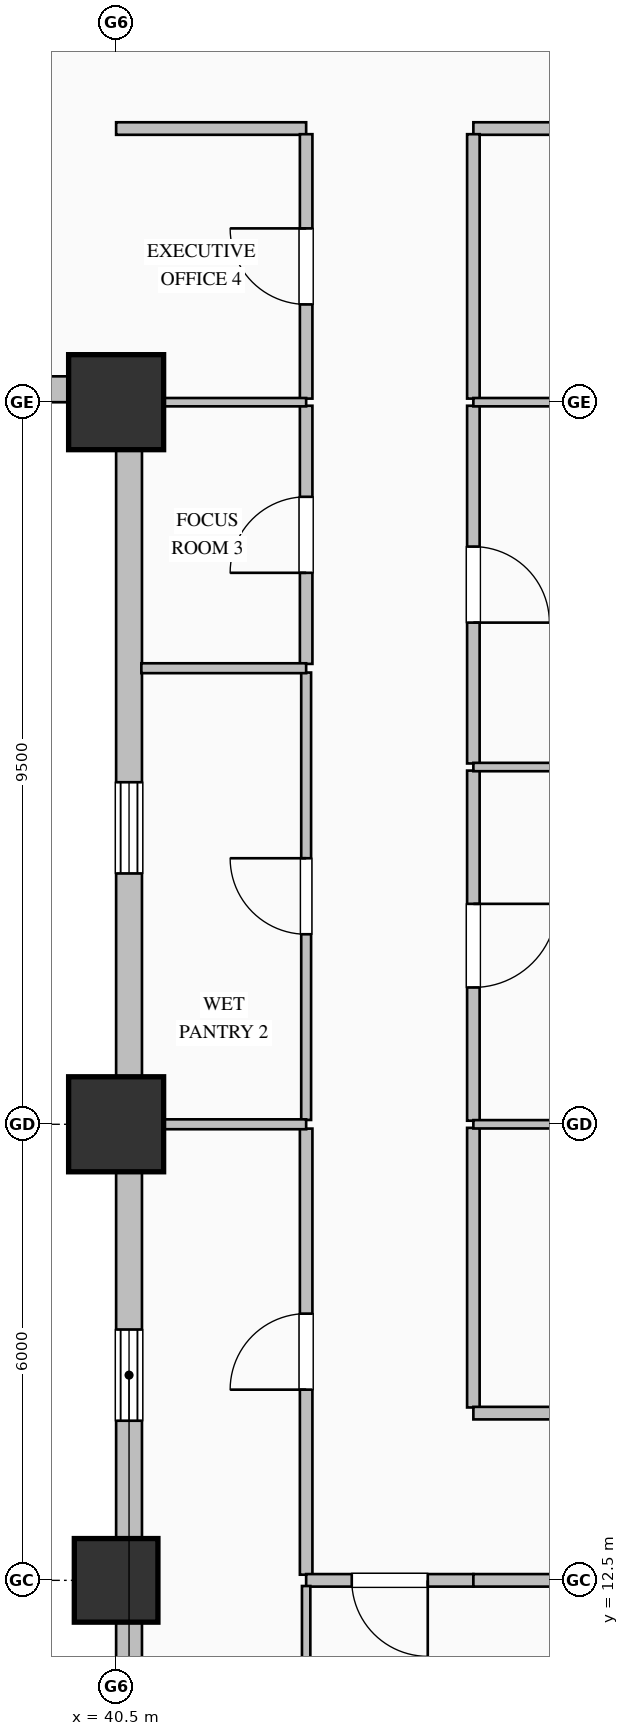
"""IFC4 building model, lengths in metres.
Left out: names, types, materials, properties, quantities, classifications, styles, units other than length and angle.
Written with IfcOpenShell. Run it as: python <this file> out.ifc"""

import sys

from ifc_helpers import new_model, si_unit, direction, frame, frame_2d, origin, origin_2d, place, context, subcontext, project, spatial, rectangle, hollow_rectangle, extrude, element, fill, save


model = new_model("IFC4")
c1 = context("Model", 3, precision=1e-05, world=origin(), true_north=direction((0.0, 1.0)))
c2 = subcontext(c1, "Body", "Model", "MODEL_VIEW")
j1 = project(units=[si_unit("LENGTHUNIT", "METRE"), si_unit("PLANEANGLEUNIT", "RADIAN")], contexts=[c1])
p1 = place(None, origin())
s1 = spatial("IfcSite", under=j1, at=p1, CompositionType="ELEMENT")
p2 = place(p1, origin())
s2 = spatial("IfcBuilding", under=s1, at=p2, CompositionType="ELEMENT")
p3 = place(p2, frame((0.0, 0.0, 40.2)))
s3 = spatial("IfcBuildingStorey", under=s2, at=p3, CompositionType="ELEMENT", Elevation=40.2)
p4 = place(p3, frame((40.5, 12.5, 0.0), z_axis=(0.0, 0.0, 1.0), x_axis=(1.0, 0.0, 0.0)))
e1 = element("IfcColumn", 1, at=p4, inside=s3, PredefinedType="COLUMN", context=c2, shape_type="SweptSolid", body=[
    extrude(hollow_rectangle(XDim=1.1, YDim=1.1, WallThickness=0.04, at=origin_2d()), origin(), (0.0, 0.0, 1.0), 4.0),
])
for number, where, z_axis, x_axis in (
    (2, (40.5, 18.5, 0.0), (0.0, 0.0, 1.0), (1.0, 0.0, 0.0)),
    (3, (40.5, 28.0, 0.0), (0.0, 0.0, 1.0), (1.0, 0.0, 0.0)),
):
    element("IfcColumn", number, at=place(p3, frame(where, z_axis=z_axis, x_axis=x_axis)), inside=s3, PredefinedType="COLUMN", context=c2, shape_type="SweptSolid", body=[
        extrude(hollow_rectangle(XDim=1.25, YDim=1.25, WallThickness=0.045, at=origin_2d()), origin(), (0.0, 0.0, 1.0), 4.0),
    ])
p5 = place(p3, frame((40.67, 8.0, 0.0), z_axis=(0.0, 0.0, 1.0), x_axis=(0.0, 1.0, 0.0)))
e4 = element("IfcWall", 4, at=p5, inside=s3, PredefinedType="SOLIDWALL", context=c2, shape_type="SweptSolid", body=[
    extrude(rectangle(XDim=20.34, YDim=0.34, at=frame_2d((10.17, 0.0))), origin(), (0.0, 0.0, 1.0), 3.05),
])
p6 = place(p5, frame((6.6, 0.0, 0.7)))
e5 = element("IfcOpeningElement", 5, at=p6, cuts=e4, PredefinedType="OPENING", context=c2, shape_type="SweptSolid", body=[
    extrude(rectangle(XDim=1.2, YDim=1.85, at=frame_2d((0.6, 0.925))), frame((0.0, 0.18, 0.0), z_axis=(0.0, -1.0, 0.0), x_axis=(1.0, 0.0, 0.0)), (0.0, 0.0, 1.0), 0.36),
])
p7 = place(p5, frame((13.8, 0.0, 0.7)))
e6 = element("IfcOpeningElement", 6, at=p7, cuts=e4, PredefinedType="OPENING", context=c2, shape_type="SweptSolid", body=[
    extrude(rectangle(XDim=1.2, YDim=1.85, at=frame_2d((0.6, 0.925))), frame((0.0, 0.18, 0.0), z_axis=(0.0, -1.0, 0.0), x_axis=(1.0, 0.0, 0.0)), (0.0, 0.0, 1.0), 0.36),
])
p8 = place(p3, frame((40.52, 28.17, 0.0), z_axis=(0.0, 0.0, 1.0), x_axis=(-1.0, 0.0, 0.0)))
e7 = element("IfcWall", 7, at=p8, inside=s3, PredefinedType="SOLIDWALL", context=c2, shape_type="SweptSolid", body=[
    extrude(rectangle(XDim=36.52, YDim=0.34, at=frame_2d((18.26, 0.0))), origin(), (0.0, 0.0, 1.0), 3.05),
])
p9 = place(p8, frame((10.2, 0.0, 0.7)))
e8 = element("IfcOpeningElement", 8, at=p9, cuts=e7, PredefinedType="OPENING", context=c2, shape_type="SweptSolid", body=[
    extrude(rectangle(XDim=1.2, YDim=1.85, at=frame_2d((0.6, 0.925))), frame((0.0, 0.18, 0.0), z_axis=(0.0, -1.0, 0.0), x_axis=(1.0, 0.0, 0.0)), (0.0, 0.0, 1.0), 0.36),
])
p10 = place(p8, frame((13.8, 0.0, 0.7)))
e9 = element("IfcOpeningElement", 9, at=p10, cuts=e7, PredefinedType="OPENING", context=c2, shape_type="SweptSolid", body=[
    extrude(rectangle(XDim=1.2, YDim=1.85, at=frame_2d((0.6, 0.925))), frame((0.0, 0.18, 0.0), z_axis=(0.0, -1.0, 0.0), x_axis=(1.0, 0.0, 0.0)), (0.0, 0.0, 1.0), 0.36),
])
p11 = place(p8, frame((17.4, 0.0, 0.7)))
e10 = element("IfcOpeningElement", 10, at=p11, cuts=e7, PredefinedType="OPENING", context=c2, shape_type="SweptSolid", body=[
    extrude(rectangle(XDim=1.2, YDim=1.85, at=frame_2d((0.6, 0.925))), frame((0.0, 0.18, 0.0), z_axis=(0.0, -1.0, 0.0), x_axis=(1.0, 0.0, 0.0)), (0.0, 0.0, 1.0), 0.36),
])
p12 = place(p8, frame((21.0, 0.0, 0.7)))
e11 = element("IfcOpeningElement", 11, at=p12, cuts=e7, PredefinedType="OPENING", context=c2, shape_type="SweptSolid", body=[
    extrude(rectangle(XDim=1.2, YDim=1.85, at=frame_2d((0.6, 0.925))), frame((0.0, 0.18, 0.0), z_axis=(0.0, -1.0, 0.0), x_axis=(1.0, 0.0, 0.0)), (0.0, 0.0, 1.0), 0.36),
])
p13 = place(p8, frame((28.2, 0.0, 0.7)))
e12 = element("IfcOpeningElement", 12, at=p13, cuts=e7, PredefinedType="OPENING", context=c2, shape_type="SweptSolid", body=[
    extrude(rectangle(XDim=1.2, YDim=1.85, at=frame_2d((0.6, 0.925))), frame((0.0, 0.18, 0.0), z_axis=(0.0, -1.0, 0.0), x_axis=(1.0, 0.0, 0.0)), (0.0, 0.0, 1.0), 0.36),
])
p14 = place(p3, frame((56.5, 31.6, 0.0), z_axis=(0.0, 0.0, 1.0), x_axis=(-1.0, 0.0, 0.0)))
e13 = element("IfcWall", 13, at=p14, inside=s3, PredefinedType="PARTITIONING", context=c2, shape_type="SweptSolid", body=[
    extrude(rectangle(XDim=11.3, YDim=0.165, at=frame_2d((5.65, 0.0))), origin(), (0.0, 0.0, 1.0), 3.75),
])
p15 = place(p14, frame((5.15, 0.0, 0.0)))
e14 = element("IfcOpeningElement", 14, at=p15, cuts=e13, PredefinedType="OPENING", context=c2, shape_type="SweptSolid", body=[
    extrude(rectangle(XDim=1.0, YDim=2.15, at=frame_2d((0.5, 1.075))), frame((0.0, 0.093, 0.0), z_axis=(0.0, -1.0, 0.0), x_axis=(1.0, 0.0, 0.0)), (0.0, 0.0, 1.0), 0.185),
])
p16 = place(p3, frame((43.0, 31.6, 0.0), z_axis=(0.0, 0.0, 1.0), x_axis=(-1.0, 0.0, 0.0)))
e15 = element("IfcWall", 15, at=p16, inside=s3, PredefinedType="PARTITIONING", context=c2, shape_type="SweptSolid", body=[
    extrude(rectangle(XDim=2.5, YDim=0.165, at=frame_2d((1.25, 0.0))), origin(), (0.0, 0.0, 1.0), 3.75),
])
p17 = place(p3, frame((45.2, 18.453, 0.0), z_axis=(0.0, 0.0, 1.0), x_axis=(0.0, -1.0, 0.0)))
e16 = element("IfcWall", 16, at=p17, inside=s3, PredefinedType="PARTITIONING", context=c2, shape_type="SweptSolid", body=[
    extrude(rectangle(XDim=3.678, YDim=0.165, at=frame_2d((1.839, 0.0))), origin(), (0.0, 0.0, 1.0), 3.75),
])
p18 = place(p3, frame((45.2, 23.153, 0.0), z_axis=(0.0, 0.0, 1.0), x_axis=(0.0, -1.0, 0.0)))
e17 = element("IfcWall", 17, at=p18, inside=s3, PredefinedType="PARTITIONING", context=c2, shape_type="SweptSolid", body=[
    extrude(rectangle(XDim=4.606, YDim=0.165, at=frame_2d((2.303, 0.0))), origin(), (0.0, 0.0, 1.0), 3.75),
])
p19 = place(p18, frame((1.753, 0.0, 0.0)))
e18 = element("IfcOpeningElement", 18, at=p19, cuts=e17, PredefinedType="OPENING", context=c2, shape_type="SweptSolid", body=[
    extrude(rectangle(XDim=1.1, YDim=2.2, at=frame_2d((0.55, 1.1))), frame((0.0, 0.093, 0.0), z_axis=(0.0, -1.0, 0.0), x_axis=(1.0, 0.0, 0.0)), (0.0, 0.0, 1.0), 0.185),
])
p20 = place(p3, frame((45.2, 27.953, 0.0), z_axis=(0.0, 0.0, 1.0), x_axis=(0.0, -1.0, 0.0)))
e19 = element("IfcWall", 19, at=p20, inside=s3, PredefinedType="PARTITIONING", context=c2, shape_type="SweptSolid", body=[
    extrude(rectangle(XDim=4.706, YDim=0.165, at=frame_2d((2.353, 0.0))), origin(), (0.0, 0.0, 1.0), 3.75),
])
p21 = place(p20, frame((1.853, 0.0, 0.0)))
e20 = element("IfcOpeningElement", 20, at=p21, cuts=e19, PredefinedType="OPENING", context=c2, shape_type="SweptSolid", body=[
    extrude(rectangle(XDim=1.0, YDim=2.15, at=frame_2d((0.5, 1.075))), frame((0.0, 0.093, 0.0), z_axis=(0.0, -1.0, 0.0), x_axis=(1.0, 0.0, 0.0)), (0.0, 0.0, 1.0), 0.185),
])
p22 = place(p3, frame((45.2, 31.525, 0.0), z_axis=(0.0, 0.0, 1.0), x_axis=(0.0, -1.0, 0.0)))
e21 = element("IfcWall", 21, at=p22, inside=s3, PredefinedType="PARTITIONING", context=c2, shape_type="SweptSolid", body=[
    extrude(rectangle(XDim=3.478, YDim=0.165, at=frame_2d((1.739, 0.0))), origin(), (0.0, 0.0, 1.0), 3.75),
])
p23 = place(p3, frame((43.0, 12.574, 0.0), z_axis=(0.0, 0.0, 1.0), x_axis=(0.0, 1.0, 0.0)))
e22 = element("IfcWall", 22, at=p23, inside=s3, PredefinedType="PARTITIONING", context=c2, shape_type="SweptSolid", body=[
    extrude(rectangle(XDim=5.869, YDim=0.165, at=frame_2d((2.934, 0.0))), origin(), (0.0, 0.0, 1.0), 3.75),
])
p24 = place(p23, frame((2.434, 0.0, 0.0)))
e23 = element("IfcOpeningElement", 23, at=p24, cuts=e22, PredefinedType="OPENING", context=c2, shape_type="SweptSolid", body=[
    extrude(rectangle(XDim=1.0, YDim=2.15, at=frame_2d((0.5, 1.075))), frame((0.0, 0.093, 0.0), z_axis=(0.0, -1.0, 0.0), x_axis=(1.0, 0.0, 0.0)), (0.0, 0.0, 1.0), 0.185),
])
p25 = place(p3, frame((43.0, 18.557, 0.0), z_axis=(0.0, 0.0, 1.0), x_axis=(0.0, 1.0, 0.0)))
e24 = element("IfcWall", 24, at=p25, inside=s3, PredefinedType="PARTITIONING", context=c2, shape_type="SweptSolid", body=[
    extrude(rectangle(XDim=5.886, YDim=0.13, at=frame_2d((2.943, 0.0))), origin(), (0.0, 0.0, 1.0), 3.75),
])
p26 = place(p25, frame((2.443, 0.0, 0.0)))
e25 = element("IfcOpeningElement", 25, at=p26, cuts=e24, PredefinedType="OPENING", context=c2, shape_type="SweptSolid", body=[
    extrude(rectangle(XDim=1.0, YDim=2.15, at=frame_2d((0.5, 1.075))), frame((0.0, 0.075, 0.0), z_axis=(0.0, -1.0, 0.0), x_axis=(1.0, 0.0, 0.0)), (0.0, 0.0, 1.0), 0.15),
])
p27 = place(p3, frame((43.0, 24.557, 0.0), z_axis=(0.0, 0.0, 1.0), x_axis=(0.0, 1.0, 0.0)))
e26 = element("IfcWall", 26, at=p27, inside=s3, PredefinedType="PARTITIONING", context=c2, shape_type="SweptSolid", body=[
    extrude(rectangle(XDim=3.396, YDim=0.165, at=frame_2d((1.698, 0.0))), origin(), (0.0, 0.0, 1.0), 3.75),
])
p28 = place(p27, frame((1.198, 0.0, 0.0)))
e27 = element("IfcOpeningElement", 27, at=p28, cuts=e26, PredefinedType="OPENING", context=c2, shape_type="SweptSolid", body=[
    extrude(rectangle(XDim=1.0, YDim=2.15, at=frame_2d((0.5, 1.075))), frame((0.0, 0.093, 0.0), z_axis=(0.0, -1.0, 0.0), x_axis=(1.0, 0.0, 0.0)), (0.0, 0.0, 1.0), 0.185),
])
p29 = place(p3, frame((43.0, 28.047, 0.0), z_axis=(0.0, 0.0, 1.0), x_axis=(0.0, 1.0, 0.0)))
e28 = element("IfcWall", 28, at=p29, inside=s3, PredefinedType="PARTITIONING", context=c2, shape_type="SweptSolid", body=[
    extrude(rectangle(XDim=3.478, YDim=0.165, at=frame_2d((1.739, 0.0))), origin(), (0.0, 0.0, 1.0), 3.75),
])
p30 = place(p29, frame((1.239, 0.0, 0.0)))
e29 = element("IfcOpeningElement", 29, at=p30, cuts=e28, PredefinedType="OPENING", context=c2, shape_type="SweptSolid", body=[
    extrude(rectangle(XDim=1.0, YDim=2.15, at=frame_2d((0.5, 1.075))), frame((0.0, 0.093, 0.0), z_axis=(0.0, -1.0, 0.0), x_axis=(1.0, 0.0, 0.0)), (0.0, 0.0, 1.0), 0.185),
])
p31 = place(p3, frame((45.2, 12.5, 0.0), z_axis=(0.0, 0.0, 1.0), x_axis=(-1.0, 0.0, 0.0)))
e30 = element("IfcWall", 30, at=p31, inside=s3, PredefinedType="PARTITIONING", context=c2, shape_type="SweptSolid", body=[
    extrude(rectangle(XDim=2.2, YDim=0.165, at=frame_2d((1.1, 0.0))), origin(), (0.0, 0.0, 1.0), 3.042),
])
p32 = place(p31, frame((0.6, 0.0, 0.0)))
e31 = element("IfcOpeningElement", 31, at=p32, cuts=e30, PredefinedType="OPENING", context=c2, shape_type="SweptSolid", body=[
    extrude(rectangle(XDim=1.0, YDim=2.15, at=frame_2d((0.5, 1.075))), frame((0.0, 0.093, 0.0), z_axis=(0.0, -1.0, 0.0), x_axis=(1.0, 0.0, 0.0)), (0.0, 0.0, 1.0), 0.185),
])
p33 = place(p3, frame((45.2, 14.7, 0.0), z_axis=(0.0, 0.0, 1.0), x_axis=(1.0, 0.0, 0.0)))
e32 = element("IfcWall", 32, at=p33, inside=s3, PredefinedType="PARTITIONING", context=c2, shape_type="SweptSolid", body=[
    extrude(rectangle(XDim=16.3, YDim=0.165, at=frame_2d((8.15, 0.0))), origin(), (0.0, 0.0, 1.0), 3.75),
])
p34 = place(p33, frame((7.65, 0.0, 0.0)))
e33 = element("IfcOpeningElement", 33, at=p34, cuts=e32, PredefinedType="OPENING", context=c2, shape_type="SweptSolid", body=[
    extrude(rectangle(XDim=1.0, YDim=2.15, at=frame_2d((0.5, 1.075))), frame((0.0, 0.093, 0.0), z_axis=(0.0, -1.0, 0.0), x_axis=(1.0, 0.0, 0.0)), (0.0, 0.0, 1.0), 0.185),
])
p35 = place(p3, frame((46.5, 12.5, 0.0), z_axis=(0.0, 0.0, 1.0), x_axis=(-1.0, 0.0, 0.0)))
e34 = element("IfcWall", 34, at=p35, inside=s3, PredefinedType="PARTITIONING", context=c2, shape_type="SweptSolid", body=[
    extrude(rectangle(XDim=1.3, YDim=0.165, at=frame_2d((0.65, 0.0))), origin(), (0.0, 0.0, 1.0), 3.042),
])
p36 = place(p3, frame((45.2, 18.5, 0.0), z_axis=(0.0, 0.0, 1.0), x_axis=(1.0, 0.0, 0.0)))
e35 = element("IfcWall", 35, at=p36, inside=s3, PredefinedType="MOVABLE", context=c2, shape_type="SweptSolid", body=[
    extrude(rectangle(XDim=18.468, YDim=0.11, at=frame_2d((9.234, 0.0))), origin(), (0.0, 0.0, 1.0), 3.042),
])
p37 = place(p3, frame((45.2, 23.2, 0.0), z_axis=(0.0, 0.0, 1.0), x_axis=(1.0, 0.0, 0.0)))
e36 = element("IfcWall", 36, at=p37, inside=s3, PredefinedType="MOVABLE", context=c2, shape_type="SweptSolid", body=[
    extrude(rectangle(XDim=18.468, YDim=0.11, at=frame_2d((9.234, 0.0))), origin(), (0.0, 0.0, 1.0), 3.342),
])
p38 = place(p3, frame((45.2, 28.0, 0.0), z_axis=(0.0, 0.0, 1.0), x_axis=(1.0, 0.0, 0.0)))
e37 = element("IfcWall", 37, at=p38, inside=s3, PredefinedType="MOVABLE", context=c2, shape_type="SweptSolid", body=[
    extrude(rectangle(XDim=18.468, YDim=0.11, at=frame_2d((9.234, 0.0))), origin(), (0.0, 0.0, 1.0), 3.042),
])
p39 = place(p3, frame((40.832, 18.5, 0.0), z_axis=(0.0, 0.0, 1.0), x_axis=(1.0, 0.0, 0.0)))
e38 = element("IfcWall", 38, at=p39, inside=s3, PredefinedType="PARTITIONING", context=c2, shape_type="SweptSolid", body=[
    extrude(rectangle(XDim=2.168, YDim=0.13, at=frame_2d((1.084, 0.0))), origin(), (0.0, 0.0, 1.0), 3.042),
])
p40 = place(p3, frame((43.0, 12.426, 0.0), z_axis=(0.0, 0.0, 1.0), x_axis=(0.0, -1.0, 0.0)))
e39 = element("IfcWall", 39, at=p40, inside=s3, PredefinedType="MOVABLE", context=c2, shape_type="SweptSolid", body=[
    extrude(rectangle(XDim=6.456, YDim=0.11, at=frame_2d((3.228, 0.0))), origin(), (0.0, 0.0, 1.0), 3.75),
])
p41 = place(p3, frame((40.832, 24.5, 0.0), z_axis=(0.0, 0.0, 1.0), x_axis=(1.0, 0.0, 0.0)))
e40 = element("IfcWall", 40, at=p41, inside=s3, PredefinedType="PARTITIONING", context=c2, shape_type="SweptSolid", body=[
    extrude(rectangle(XDim=2.168, YDim=0.13, at=frame_2d((1.084, 0.0))), origin(), (0.0, 0.0, 1.0), 3.75),
])
p42 = place(p3, frame((40.832, 28.0, 0.0), z_axis=(0.0, 0.0, 1.0), x_axis=(1.0, 0.0, 0.0)))
e41 = element("IfcWall", 41, at=p42, inside=s3, PredefinedType="MOVABLE", context=c2, shape_type="SweptSolid", body=[
    extrude(rectangle(XDim=2.168, YDim=0.11, at=frame_2d((1.084, 0.0))), origin(), (0.0, 0.0, 1.0), 3.042),
])
p43 = place(p6, origin())
e42 = element("IfcWindow", 42, at=p43, inside=s3, PartitioningType="DOUBLE_PANEL_VERTICAL", PredefinedType="WINDOW", context=c2, shape_type="SweptSolid", body=[
    extrude(rectangle(XDim=1.2, YDim=1.85, at=frame_2d((0.6, 0.925))), frame((0.0, 0.15, 0.0), z_axis=(0.0, -1.0, 0.0), x_axis=(1.0, 0.0, 0.0)), (0.0, 0.0, 1.0), 0.06),
])
fill(e5, e42)
p44 = place(p7, origin())
e43 = element("IfcWindow", 43, at=p44, inside=s3, PartitioningType="DOUBLE_PANEL_VERTICAL", PredefinedType="WINDOW", context=c2, shape_type="SweptSolid", body=[
    extrude(rectangle(XDim=1.2, YDim=1.85, at=frame_2d((0.6, 0.925))), frame((0.0, 0.15, 0.0), z_axis=(0.0, -1.0, 0.0), x_axis=(1.0, 0.0, 0.0)), (0.0, 0.0, 1.0), 0.06),
])
fill(e6, e43)
p45 = place(p19, origin())
e44 = element("IfcDoor", 44, at=p45, inside=s3, OperationType="SINGLE_SWING_LEFT", PredefinedType="DOOR", context=c2, shape_type="SweptSolid", body=[
    extrude(rectangle(XDim=1.1, YDim=2.2, at=frame_2d((0.55, 1.1))), frame((0.0, 0.025, 0.0), z_axis=(0.0, -1.0, 0.0), x_axis=(1.0, 0.0, 0.0)), (0.0, 0.0, 1.0), 0.05),
])
fill(e18, e44)
p46 = place(p21, origin())
e45 = element("IfcDoor", 45, at=p46, inside=s3, OperationType="SINGLE_SWING_RIGHT", PredefinedType="DOOR", context=c2, shape_type="SweptSolid", body=[
    extrude(rectangle(XDim=1.0, YDim=2.15, at=frame_2d((0.5, 1.075))), frame((0.0, 0.025, 0.0), z_axis=(0.0, -1.0, 0.0), x_axis=(1.0, 0.0, 0.0)), (0.0, 0.0, 1.0), 0.05),
])
fill(e20, e45)
p47 = place(p24, origin())
e46 = element("IfcDoor", 46, at=p47, inside=s3, OperationType="SINGLE_SWING_LEFT", PredefinedType="DOOR", context=c2, shape_type="SweptSolid", body=[
    extrude(rectangle(XDim=1.0, YDim=2.15, at=frame_2d((0.5, 1.075))), frame((0.0, 0.025, 0.0), z_axis=(0.0, -1.0, 0.0), x_axis=(1.0, 0.0, 0.0)), (0.0, 0.0, 1.0), 0.05),
])
fill(e23, e46)
p48 = place(p26, origin())
e47 = element("IfcDoor", 47, at=p48, inside=s3, OperationType="SINGLE_SWING_RIGHT", PredefinedType="DOOR", context=c2, shape_type="SweptSolid", body=[
    extrude(rectangle(XDim=1.0, YDim=2.15, at=frame_2d((0.5, 1.075))), frame((0.0, 0.025, 0.0), z_axis=(0.0, -1.0, 0.0), x_axis=(1.0, 0.0, 0.0)), (0.0, 0.0, 1.0), 0.05),
])
fill(e25, e47)
p49 = place(p28, origin())
e48 = element("IfcDoor", 48, at=p49, inside=s3, OperationType="SINGLE_SWING_LEFT", PredefinedType="DOOR", context=c2, shape_type="SweptSolid", body=[
    extrude(rectangle(XDim=1.0, YDim=2.15, at=frame_2d((0.5, 1.075))), frame((0.0, 0.025, 0.0), z_axis=(0.0, -1.0, 0.0), x_axis=(1.0, 0.0, 0.0)), (0.0, 0.0, 1.0), 0.05),
])
fill(e27, e48)
p50 = place(p30, origin())
e49 = element("IfcDoor", 49, at=p50, inside=s3, OperationType="SINGLE_SWING_RIGHT", PredefinedType="DOOR", context=c2, shape_type="SweptSolid", body=[
    extrude(rectangle(XDim=1.0, YDim=2.15, at=frame_2d((0.5, 1.075))), frame((0.0, 0.025, 0.0), z_axis=(0.0, -1.0, 0.0), x_axis=(1.0, 0.0, 0.0)), (0.0, 0.0, 1.0), 0.05),
])
fill(e29, e49)
p51 = place(p32, origin())
e50 = element("IfcDoor", 50, at=p51, inside=s3, OperationType="SINGLE_SWING_LEFT", PredefinedType="DOOR", context=c2, shape_type="SweptSolid", body=[
    extrude(rectangle(XDim=1.0, YDim=2.15, at=frame_2d((0.5, 1.075))), frame((0.0, 0.025, 0.0), z_axis=(0.0, -1.0, 0.0), x_axis=(1.0, 0.0, 0.0)), (0.0, 0.0, 1.0), 0.05),
])
fill(e31, e50)
save(model, sys.argv[1])
